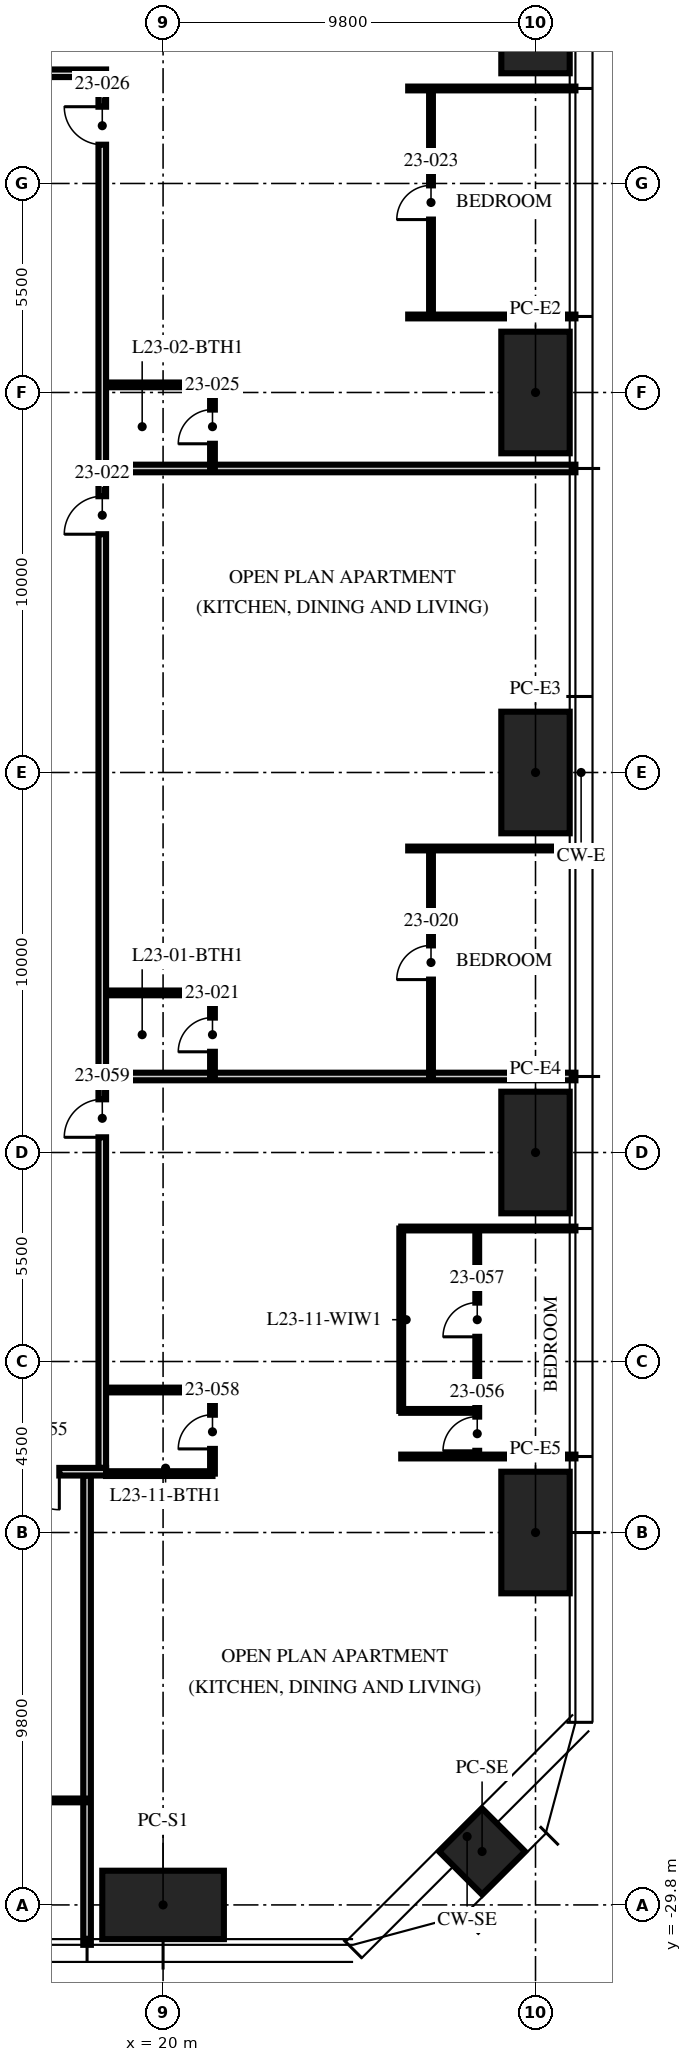
"""IFC4 building model, lengths in metres.
Left out: names, types, materials, properties, quantities, classifications, styles, units other than length and angle.
Written with IfcOpenShell. Run it as: python <this file> out.ifc"""

import sys

from ifc_helpers import new_model, si_unit, direction, frame, frame_2d, origin, origin_2d, place, context, subcontext, project, spatial, rectangle, hollow_rectangle, extrude, element, fill, save


model = new_model("IFC4")
c1 = context("Model", 3, precision=1e-05, world=origin(), true_north=direction((0.0, 1.0)))
c2 = subcontext(c1, "Body", "Model", "MODEL_VIEW")
j1 = project(units=[si_unit("LENGTHUNIT", "METRE"), si_unit("PLANEANGLEUNIT", "RADIAN")], contexts=[c1])
p1 = place(None, origin())
s1 = spatial("IfcSite", under=j1, at=p1, CompositionType="ELEMENT")
p2 = place(p1, origin())
s2 = spatial("IfcBuilding", under=s1, at=p2, CompositionType="ELEMENT")
p3 = place(p2, frame((0.0, 0.0, 92.25)))
s3 = spatial("IfcBuildingStorey", under=s2, at=p3, CompositionType="ELEMENT", Elevation=92.25)
for number, where, z_axis, x_axis in (
    (1, (29.8, 20.0, 0.0), (0.0, 0.0, 1.0), (0.0, 1.0, 0.0)),
    (2, (29.8, 10.0, 0.0), (0.0, 0.0, 1.0), (0.0, 1.0, 0.0)),
    (3, (29.8, 0.0, 0.0), (0.0, 0.0, 1.0), (0.0, 1.0, 0.0)),
    (4, (29.8, -10.0, 0.0), (0.0, 0.0, 1.0), (0.0, 1.0, 0.0)),
    (5, (29.8, -20.0, 0.0), (0.0, 0.0, 1.0), (0.0, 1.0, 0.0)),
    (6, (20.0, -29.8, 0.0), (0.0, 0.0, 1.0), (1.0, 0.0, 0.0)),
):
    element("IfcColumn", number, at=place(p3, frame(where, z_axis=z_axis, x_axis=x_axis)), inside=s3, PredefinedType="COLUMN", context=c2, shape_type="SweptSolid", body=[
        extrude(hollow_rectangle(XDim=3.2, YDim=1.8, WallThickness=0.2, at=origin_2d()), origin(), (0.0, 0.0, 1.0), 3.75),
    ])
p4 = place(p3, frame((28.394, -28.394, 0.0), z_axis=(0.0, 0.0, 1.0), x_axis=(0.707106781187, 0.707106781187, 0.0)))
e7 = element("IfcColumn", 7, at=p4, inside=s3, PredefinedType="COLUMN", context=c2, shape_type="SweptSolid", body=[
    extrude(hollow_rectangle(XDim=1.6, YDim=1.6, WallThickness=0.1, at=origin_2d()), origin(), (0.0, 0.0, 1.0), 3.75),
])
p5 = place(p3, frame((18.5, -8.0, 0.0), z_axis=(0.0, 0.0, 1.0), x_axis=(1.0, 0.0, 0.0)))
e8 = element("IfcWall", 8, at=p5, inside=s3, PredefinedType="PARTITIONING", context=c2, shape_type="SweptSolid", body=[
    extrude(rectangle(XDim=12.35, YDim=0.2, at=frame_2d((6.175, 0.0))), origin(), (0.0, 0.0, 1.0), 2.61),
])
p6 = place(p3, frame((26.45, -2.0, 0.0), z_axis=(0.0, 0.0, 1.0), x_axis=(1.0, 0.0, 0.0)))
e9 = element("IfcWall", 9, at=p6, inside=s3, PredefinedType="PARTITIONING", context=c2, shape_type="SweptSolid", body=[
    extrude(rectangle(XDim=4.4, YDim=0.1, at=frame_2d((2.2, 0.0))), origin(), (0.0, 0.0, 1.0), 2.61),
])
p7 = place(p3, frame((18.5, 8.0, 0.0), z_axis=(0.0, 0.0, 1.0), x_axis=(1.0, 0.0, 0.0)))
e10 = element("IfcWall", 10, at=p7, inside=s3, PredefinedType="PARTITIONING", context=c2, shape_type="SweptSolid", body=[
    extrude(rectangle(XDim=12.35, YDim=0.2, at=frame_2d((6.175, 0.0))), origin(), (0.0, 0.0, 1.0), 2.61),
])
for number, where, z_axis, x_axis in (
    (11, (26.45, 12.0, 0.0), (0.0, 0.0, 1.0), (1.0, 0.0, 0.0)),
    (12, (26.45, 18.0, 0.0), (0.0, 0.0, 1.0), (1.0, 0.0, 0.0)),
):
    element("IfcWall", number, at=place(p3, frame(where, z_axis=z_axis, x_axis=x_axis)), inside=s3, PredefinedType="PARTITIONING", context=c2, shape_type="SweptSolid", body=[
        extrude(rectangle(XDim=4.4, YDim=0.1, at=frame_2d((2.2, 0.0))), origin(), (0.0, 0.0, 1.0), 2.61),
    ])
p8 = place(p3, frame((18.0, -18.5, 0.0), z_axis=(0.0, 0.0, 1.0), x_axis=(0.0, -1.0, 0.0)))
e13 = element("IfcWall", 13, at=p8, inside=s3, PredefinedType="PARTITIONING", context=c2, shape_type="SweptSolid", body=[
    extrude(rectangle(XDim=12.35, YDim=0.2, at=frame_2d((6.175, 0.0))), origin(), (0.0, 0.0, 1.0), 2.3),
])
for number, where, z_axis, x_axis in (
    (14, (26.267, -18.0, 0.0), (0.0, 0.0, 1.0), (1.0, 0.0, 0.0)),
    (15, (26.267, -12.0, 0.0), (0.0, 0.0, 1.0), (1.0, 0.0, 0.0)),
):
    element("IfcWall", number, at=place(p3, frame(where, z_axis=z_axis, x_axis=x_axis)), inside=s3, PredefinedType="PARTITIONING", context=c2, shape_type="SweptSolid", body=[
        extrude(rectangle(XDim=4.583, YDim=0.1, at=frame_2d((2.292, 0.0))), origin(), (0.0, 0.0, 1.0), 2.61),
    ])
p9 = place(p3, frame((27.05, -8.0, 0.0), z_axis=(0.0, 0.0, 1.0), x_axis=(0.0, 1.0, 0.0)))
e16 = element("IfcWall", 16, at=p9, inside=s3, PredefinedType="PARTITIONING", context=c2, shape_type="SweptSolid", body=[
    extrude(rectangle(XDim=6.0, YDim=0.1, at=frame_2d((3.0, 0.0))), origin(), (0.0, 0.0, 1.0), 2.6),
])
p10 = place(p9, frame((2.55, 0.0, 0.0)))
e17 = element("IfcOpeningElement", 17, at=p10, cuts=e16, PredefinedType="OPENING", context=c2, shape_type="SweptSolid", body=[
    extrude(rectangle(XDim=0.9, YDim=2.1, at=frame_2d((0.45, 1.05))), frame((0.0, 0.06, 0.0), z_axis=(0.0, -1.0, 0.0), x_axis=(1.0, 0.0, 0.0)), (0.0, 0.0, 1.0), 0.12),
])
p11 = place(p3, frame((21.3, -8.0, 0.0), z_axis=(0.0, 0.0, 1.0), x_axis=(0.0, 1.0, 0.0)))
e18 = element("IfcWall", 18, at=p11, inside=s3, PredefinedType="PARTITIONING", context=c2, shape_type="SweptSolid", body=[
    extrude(rectangle(XDim=2.2, YDim=0.125, at=frame_2d((1.1, 0.0))), origin(), (0.0, 0.0, 1.0), 3.5),
])
p12 = place(p11, frame((0.65, 0.0, 0.0)))
e19 = element("IfcOpeningElement", 19, at=p12, cuts=e18, PredefinedType="OPENING", context=c2, shape_type="SweptSolid", body=[
    extrude(rectangle(XDim=0.9, YDim=2.1, at=frame_2d((0.45, 1.05))), frame((0.0, 0.073, 0.0), z_axis=(0.0, -1.0, 0.0), x_axis=(1.0, 0.0, 0.0)), (0.0, 0.0, 1.0), 0.145),
])
p13 = place(p3, frame((18.5, -5.8, 0.0), z_axis=(0.0, 0.0, 1.0), x_axis=(1.0, 0.0, 0.0)))
e20 = element("IfcWall", 20, at=p13, inside=s3, PredefinedType="PARTITIONING", context=c2, shape_type="SweptSolid", body=[
    extrude(rectangle(XDim=2.8, YDim=0.125, at=frame_2d((1.4, 0.0))), origin(), (0.0, 0.0, 1.0), 3.5),
])
p14 = place(p3, frame((27.05, 12.0, 0.0), z_axis=(0.0, 0.0, 1.0), x_axis=(0.0, 1.0, 0.0)))
e21 = element("IfcWall", 21, at=p14, inside=s3, PredefinedType="PARTITIONING", context=c2, shape_type="SweptSolid", body=[
    extrude(rectangle(XDim=6.0, YDim=0.1, at=frame_2d((3.0, 0.0))), origin(), (0.0, 0.0, 1.0), 2.6),
])
p15 = place(p14, frame((2.55, 0.0, 0.0)))
e22 = element("IfcOpeningElement", 22, at=p15, cuts=e21, PredefinedType="OPENING", context=c2, shape_type="SweptSolid", body=[
    extrude(rectangle(XDim=0.9, YDim=2.1, at=frame_2d((0.45, 1.05))), frame((0.0, 0.06, 0.0), z_axis=(0.0, -1.0, 0.0), x_axis=(1.0, 0.0, 0.0)), (0.0, 0.0, 1.0), 0.12),
])
p16 = place(p3, frame((21.3, 8.0, 0.0), z_axis=(0.0, 0.0, 1.0), x_axis=(0.0, 1.0, 0.0)))
e23 = element("IfcWall", 23, at=p16, inside=s3, PredefinedType="PARTITIONING", context=c2, shape_type="SweptSolid", body=[
    extrude(rectangle(XDim=2.2, YDim=0.125, at=frame_2d((1.1, 0.0))), origin(), (0.0, 0.0, 1.0), 2.492),
])
p17 = place(p16, frame((0.65, 0.0, 0.0)))
e24 = element("IfcOpeningElement", 24, at=p17, cuts=e23, PredefinedType="OPENING", context=c2, shape_type="SweptSolid", body=[
    extrude(rectangle(XDim=0.9, YDim=2.1, at=frame_2d((0.45, 1.05))), frame((0.0, 0.073, 0.0), z_axis=(0.0, -1.0, 0.0), x_axis=(1.0, 0.0, 0.0)), (0.0, 0.0, 1.0), 0.145),
])
p18 = place(p3, frame((18.5, 10.2, 0.0), z_axis=(0.0, 0.0, 1.0), x_axis=(1.0, 0.0, 0.0)))
e25 = element("IfcWall", 25, at=p18, inside=s3, PredefinedType="PARTITIONING", context=c2, shape_type="SweptSolid", body=[
    extrude(rectangle(XDim=2.8, YDim=0.125, at=frame_2d((1.4, 0.0))), origin(), (0.0, 0.0, 1.0), 2.492),
])
p19 = place(p3, frame((12.0, -27.05, 0.0), z_axis=(0.0, 0.0, 1.0), x_axis=(1.0, 0.0, 0.0)))
e26 = element("IfcWall", 26, at=p19, inside=s3, PredefinedType="PARTITIONING", context=c2, shape_type="SweptSolid", body=[
    extrude(rectangle(XDim=6.0, YDim=0.1, at=frame_2d((3.0, 0.0))), origin(), (0.0, 0.0, 1.0), 2.6),
])
p20 = place(p19, frame((2.55, 0.0, 0.0)))
e27 = element("IfcOpeningElement", 27, at=p20, cuts=e26, PredefinedType="OPENING", context=c2, shape_type="SweptSolid", body=[
    extrude(rectangle(XDim=0.9, YDim=2.1, at=frame_2d((0.45, 1.05))), frame((0.0, 0.06, 0.0), z_axis=(0.0, -1.0, 0.0), x_axis=(1.0, 0.0, 0.0)), (0.0, 0.0, 1.0), 0.12),
])
p21 = place(p3, frame((28.267, -18.0, 0.0), z_axis=(0.0, 0.0, 1.0), x_axis=(0.0, 1.0, 0.0)))
e28 = element("IfcWall", 28, at=p21, inside=s3, PredefinedType="PARTITIONING", context=c2, shape_type="SweptSolid", body=[
    extrude(rectangle(XDim=6.0, YDim=0.1, at=frame_2d((3.0, 0.0))), origin(), (0.0, 0.0, 1.0), 2.6),
])
p22 = place(p21, frame((0.15, 0.0, 0.0)))
e29 = element("IfcOpeningElement", 29, at=p22, cuts=e28, PredefinedType="OPENING", context=c2, shape_type="SweptSolid", body=[
    extrude(rectangle(XDim=0.9, YDim=2.1, at=frame_2d((0.45, 1.05))), frame((0.0, 0.06, 0.0), z_axis=(0.0, -1.0, 0.0), x_axis=(1.0, 0.0, 0.0)), (0.0, 0.0, 1.0), 0.12),
])
p23 = place(p21, frame((3.15, 0.0, 0.0)))
e30 = element("IfcOpeningElement", 30, at=p23, cuts=e28, PredefinedType="OPENING", context=c2, shape_type="SweptSolid", body=[
    extrude(rectangle(XDim=0.9, YDim=2.1, at=frame_2d((0.45, 1.05))), frame((0.0, 0.06, 0.0), z_axis=(0.0, -1.0, 0.0), x_axis=(1.0, 0.0, 0.0)), (0.0, 0.0, 1.0), 0.12),
])
p24 = place(p3, frame((26.267, -16.8, 0.0), z_axis=(0.0, 0.0, 1.0), x_axis=(1.0, 0.0, 0.0)))
e31 = element("IfcWall", 31, at=p24, inside=s3, PredefinedType="PARTITIONING", context=c2, shape_type="SweptSolid", body=[
    extrude(rectangle(XDim=2.0, YDim=0.1, at=frame_2d((1.0, 0.0))), origin(), (0.0, 0.0, 1.0), 3.5),
])
p25 = place(p3, frame((26.267, -16.8, 0.0), z_axis=(0.0, 0.0, 1.0), x_axis=(0.0, 1.0, 0.0)))
e32 = element("IfcWall", 32, at=p25, inside=s3, PredefinedType="PARTITIONING", context=c2, shape_type="SweptSolid", body=[
    extrude(rectangle(XDim=4.8, YDim=0.1, at=frame_2d((2.4, 0.0))), origin(), (0.0, 0.0, 1.0), 2.6),
])
p26 = place(p3, frame((21.3, -18.45, 0.0), z_axis=(0.0, 0.0, 1.0), x_axis=(0.0, 1.0, 0.0)))
e33 = element("IfcWall", 33, at=p26, inside=s3, PredefinedType="PARTITIONING", context=c2, shape_type="SweptSolid", body=[
    extrude(rectangle(XDim=2.2, YDim=0.125, at=frame_2d((1.1, 0.0))), origin(), (0.0, 0.0, 1.0), 3.5),
])
p27 = place(p26, frame((0.65, 0.0, 0.0)))
e34 = element("IfcOpeningElement", 34, at=p27, cuts=e33, PredefinedType="OPENING", context=c2, shape_type="SweptSolid", body=[
    extrude(rectangle(XDim=0.9, YDim=2.1, at=frame_2d((0.45, 1.05))), frame((0.0, 0.073, 0.0), z_axis=(0.0, -1.0, 0.0), x_axis=(1.0, 0.0, 0.0)), (0.0, 0.0, 1.0), 0.145),
])
p28 = place(p3, frame((18.5, -18.45, 0.0), z_axis=(0.0, 0.0, 1.0), x_axis=(1.0, 0.0, 0.0)))
e35 = element("IfcWall", 35, at=p28, inside=s3, PredefinedType="PARTITIONING", context=c2, shape_type="SweptSolid", body=[
    extrude(rectangle(XDim=2.8, YDim=0.125, at=frame_2d((1.4, 0.0))), origin(), (0.0, 0.0, 1.0), 2.3),
])
p29 = place(p3, frame((18.5, -16.25, 0.0), z_axis=(0.0, 0.0, 1.0), x_axis=(1.0, 0.0, 0.0)))
e36 = element("IfcWall", 36, at=p29, inside=s3, PredefinedType="PARTITIONING", context=c2, shape_type="SweptSolid", body=[
    extrude(rectangle(XDim=2.8, YDim=0.125, at=frame_2d((1.4, 0.0))), origin(), (0.0, 0.0, 1.0), 3.5),
])
p30 = place(p3, frame((18.4, -18.3, 0.0), z_axis=(0.0, 0.0, 1.0), x_axis=(0.0, 1.0, 0.0)))
e37 = element("IfcWall", 37, at=p30, inside=s3, PredefinedType="PARTITIONING", context=c2, shape_type="SweptSolid", body=[
    extrude(rectangle(XDim=36.6, YDim=0.2, at=frame_2d((18.3, 0.0))), origin(), (0.0, 0.0, 1.0), 2.3),
])
p31 = place(p30, frame((24.57, 0.0, 0.0)))
e38 = element("IfcOpeningElement", 38, at=p31, cuts=e37, PredefinedType="OPENING", context=c2, shape_type="SweptSolid", body=[
    extrude(rectangle(XDim=1.0, YDim=2.2, at=frame_2d((0.5, 1.1))), frame((0.0, 0.11, 0.0), z_axis=(0.0, -1.0, 0.0), x_axis=(1.0, 0.0, 0.0)), (0.0, 0.0, 1.0), 0.22),
])
p32 = place(p30, frame((34.82, 0.0, 0.0)))
e39 = element("IfcOpeningElement", 39, at=p32, cuts=e37, PredefinedType="OPENING", context=c2, shape_type="SweptSolid", body=[
    extrude(rectangle(XDim=1.0, YDim=2.2, at=frame_2d((0.5, 1.1))), frame((0.0, 0.11, 0.0), z_axis=(0.0, -1.0, 0.0), x_axis=(1.0, 0.0, 0.0)), (0.0, 0.0, 1.0), 0.22),
])
p33 = place(p30, frame((8.7, 0.0, 0.0)))
e40 = element("IfcOpeningElement", 40, at=p33, cuts=e37, PredefinedType="OPENING", context=c2, shape_type="SweptSolid", body=[
    extrude(rectangle(XDim=1.0, YDim=2.2, at=frame_2d((0.5, 1.1))), frame((0.0, 0.11, 0.0), z_axis=(0.0, -1.0, 0.0), x_axis=(1.0, 0.0, 0.0)), (0.0, 0.0, 1.0), 0.22),
])
p34 = place(p3, frame((-6.0, 18.4, 0.0), z_axis=(0.0, 0.0, 1.0), x_axis=(1.0, 0.0, 0.0)))
e41 = element("IfcWall", 41, at=p34, inside=s3, PredefinedType="PARTITIONING", context=c2, shape_type="SweptSolid", body=[
    extrude(rectangle(XDim=24.5, YDim=0.2, at=frame_2d((12.25, 0.0))), origin(), (0.0, 0.0, 1.0), 2.3),
])
p35 = place(p3, frame((18.5, -18.4, 0.0), z_axis=(0.0, 0.0, 1.0), x_axis=(-1.0, 0.0, 0.0)))
e42 = element("IfcWall", 42, at=p35, inside=s3, PredefinedType="PARTITIONING", context=c2, shape_type="SweptSolid", body=[
    extrude(rectangle(XDim=24.5, YDim=0.2, at=frame_2d((12.25, 0.0))), origin(), (0.0, 0.0, 1.0), 2.3),
])
p36 = place(p35, frame((1.23, 0.0, 0.0)))
e43 = element("IfcOpeningElement", 43, at=p36, cuts=e42, PredefinedType="OPENING", context=c2, shape_type="SweptSolid", body=[
    extrude(rectangle(XDim=1.0, YDim=2.2, at=frame_2d((0.5, 1.1))), frame((0.0, 0.11, 0.0), z_axis=(0.0, -1.0, 0.0), x_axis=(1.0, 0.0, 0.0)), (0.0, 0.0, 1.0), 0.22),
])
p37 = place(p10, origin())
e44 = element("IfcDoor", 44, at=p37, inside=s3, OperationType="SINGLE_SWING_LEFT", PredefinedType="DOOR", context=c2, shape_type="SweptSolid", body=[
    extrude(rectangle(XDim=0.9, YDim=2.1, at=frame_2d((0.45, 1.05))), frame((0.0, 0.025, 0.0), z_axis=(0.0, -1.0, 0.0), x_axis=(1.0, 0.0, 0.0)), (0.0, 0.0, 1.0), 0.05),
])
fill(e17, e44)
p38 = place(p12, origin())
e45 = element("IfcDoor", 45, at=p38, inside=s3, OperationType="SINGLE_SWING_LEFT", PredefinedType="DOOR", context=c2, shape_type="SweptSolid", body=[
    extrude(rectangle(XDim=0.9, YDim=2.1, at=frame_2d((0.45, 1.05))), frame((0.0, 0.025, 0.0), z_axis=(0.0, -1.0, 0.0), x_axis=(1.0, 0.0, 0.0)), (0.0, 0.0, 1.0), 0.05),
])
fill(e19, e45)
p39 = place(p31, origin())
e46 = element("IfcDoor", 46, at=p39, inside=s3, OperationType="SINGLE_SWING_LEFT", PredefinedType="DOOR", context=c2, shape_type="SweptSolid", body=[
    extrude(rectangle(XDim=1.0, YDim=2.2, at=frame_2d((0.5, 1.1))), frame((0.0, 0.025, 0.0), z_axis=(0.0, -1.0, 0.0), x_axis=(1.0, 0.0, 0.0)), (0.0, 0.0, 1.0), 0.05),
])
fill(e38, e46)
p40 = place(p15, origin())
e47 = element("IfcDoor", 47, at=p40, inside=s3, OperationType="SINGLE_SWING_LEFT", PredefinedType="DOOR", context=c2, shape_type="SweptSolid", body=[
    extrude(rectangle(XDim=0.9, YDim=2.1, at=frame_2d((0.45, 1.05))), frame((0.0, 0.025, 0.0), z_axis=(0.0, -1.0, 0.0), x_axis=(1.0, 0.0, 0.0)), (0.0, 0.0, 1.0), 0.05),
])
fill(e22, e47)
p41 = place(p17, origin())
e48 = element("IfcDoor", 48, at=p41, inside=s3, OperationType="SINGLE_SWING_LEFT", PredefinedType="DOOR", context=c2, shape_type="SweptSolid", body=[
    extrude(rectangle(XDim=0.9, YDim=2.1, at=frame_2d((0.45, 1.05))), frame((0.0, 0.025, 0.0), z_axis=(0.0, -1.0, 0.0), x_axis=(1.0, 0.0, 0.0)), (0.0, 0.0, 1.0), 0.05),
])
fill(e24, e48)
p42 = place(p32, origin())
e49 = element("IfcDoor", 49, at=p42, inside=s3, OperationType="SINGLE_SWING_RIGHT", PredefinedType="DOOR", context=c2, shape_type="SweptSolid", body=[
    extrude(rectangle(XDim=1.0, YDim=2.2, at=frame_2d((0.5, 1.1))), frame((0.0, 0.025, 0.0), z_axis=(0.0, -1.0, 0.0), x_axis=(1.0, 0.0, 0.0)), (0.0, 0.0, 1.0), 0.05),
])
fill(e39, e49)
p43 = place(p36, origin())
e50 = element("IfcDoor", 50, at=p43, inside=s3, OperationType="SINGLE_SWING_LEFT", PredefinedType="DOOR", context=c2, shape_type="SweptSolid", body=[
    extrude(rectangle(XDim=1.0, YDim=2.2, at=frame_2d((0.5, 1.1))), frame((0.0, 0.025, 0.0), z_axis=(0.0, -1.0, 0.0), x_axis=(1.0, 0.0, 0.0)), (0.0, 0.0, 1.0), 0.05),
])
fill(e43, e50)
p44 = place(p22, origin())
e51 = element("IfcDoor", 51, at=p44, inside=s3, OperationType="SINGLE_SWING_LEFT", PredefinedType="DOOR", context=c2, shape_type="SweptSolid", body=[
    extrude(rectangle(XDim=0.9, YDim=2.1, at=frame_2d((0.45, 1.05))), frame((0.0, 0.025, 0.0), z_axis=(0.0, -1.0, 0.0), x_axis=(1.0, 0.0, 0.0)), (0.0, 0.0, 1.0), 0.05),
])
fill(e29, e51)
p45 = place(p23, origin())
e52 = element("IfcDoor", 52, at=p45, inside=s3, OperationType="SINGLE_SWING_LEFT", PredefinedType="DOOR", context=c2, shape_type="SweptSolid", body=[
    extrude(rectangle(XDim=0.9, YDim=2.1, at=frame_2d((0.45, 1.05))), frame((0.0, 0.025, 0.0), z_axis=(0.0, -1.0, 0.0), x_axis=(1.0, 0.0, 0.0)), (0.0, 0.0, 1.0), 0.05),
])
fill(e30, e52)
p46 = place(p27, origin())
e53 = element("IfcDoor", 53, at=p46, inside=s3, OperationType="SINGLE_SWING_LEFT", PredefinedType="DOOR", context=c2, shape_type="SweptSolid", body=[
    extrude(rectangle(XDim=0.9, YDim=2.1, at=frame_2d((0.45, 1.05))), frame((0.0, 0.025, 0.0), z_axis=(0.0, -1.0, 0.0), x_axis=(1.0, 0.0, 0.0)), (0.0, 0.0, 1.0), 0.05),
])
fill(e34, e53)
p47 = place(p33, origin())
e54 = element("IfcDoor", 54, at=p47, inside=s3, OperationType="SINGLE_SWING_LEFT", PredefinedType="DOOR", context=c2, shape_type="SweptSolid", body=[
    extrude(rectangle(XDim=1.0, YDim=2.2, at=frame_2d((0.5, 1.1))), frame((0.0, 0.025, 0.0), z_axis=(0.0, -1.0, 0.0), x_axis=(1.0, 0.0, 0.0)), (0.0, 0.0, 1.0), 0.05),
])
fill(e40, e54)
save(model, sys.argv[1])
